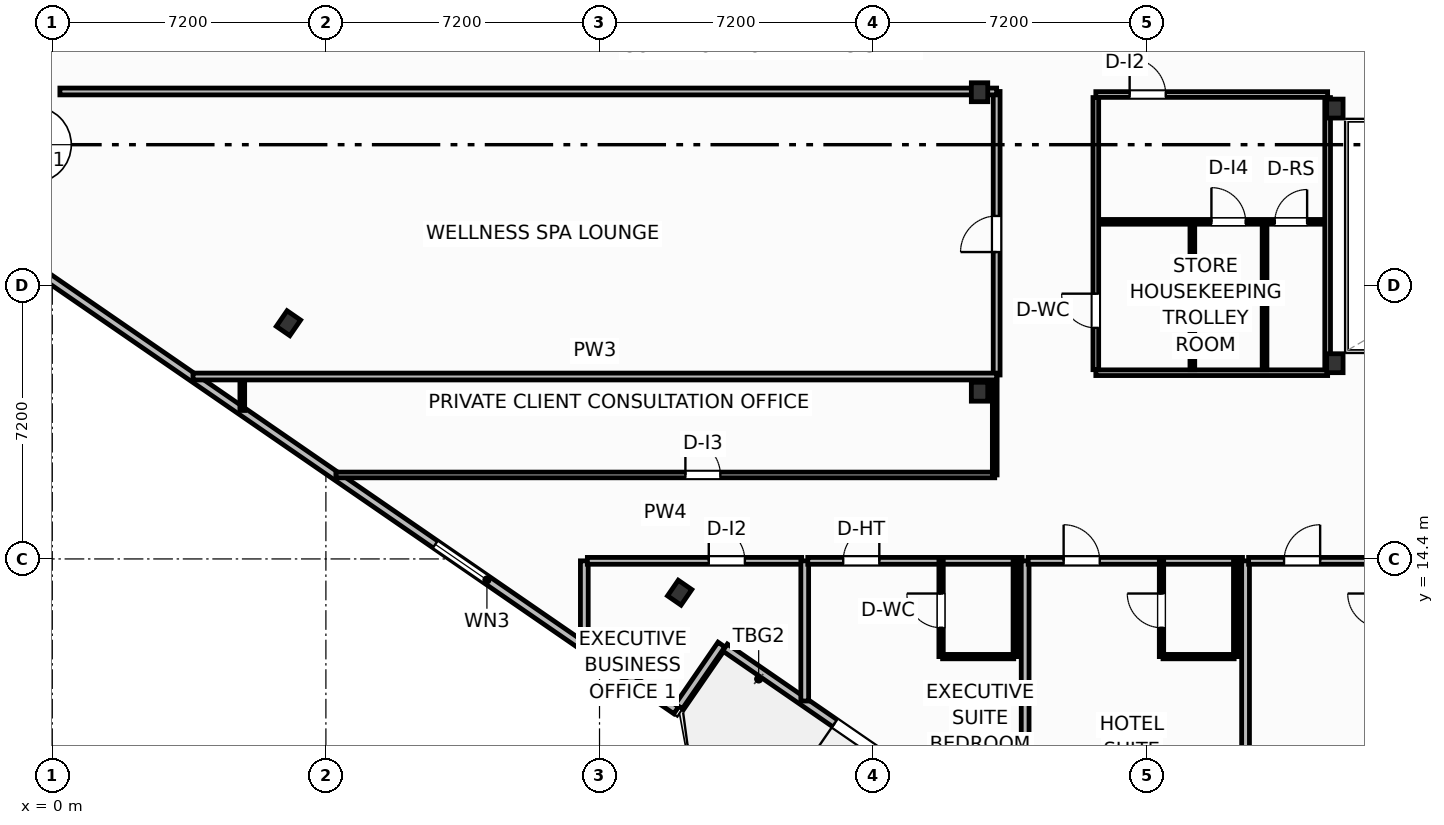
"""IFC4 building model, lengths in metres.
Left out: names, types, materials, properties, quantities, classifications, styles, units other than length and angle.
Written with IfcOpenShell. Run it as: python <this file> out.ifc"""

import sys

from ifc_helpers import new_model, si_unit, direction, frame, frame_2d, origin, origin_2d, place, context, subcontext, project, spatial, rectangle, i_section, extrude, element, fill, save


model = new_model("IFC4")
c1 = context("Model", 3, precision=1e-05, world=origin(), true_north=direction((0.0, 1.0)))
c2 = subcontext(c1, "Body", "Model", "MODEL_VIEW")
j1 = project(units=[si_unit("LENGTHUNIT", "METRE"), si_unit("PLANEANGLEUNIT", "RADIAN")], contexts=[c1])
p1 = place(None, origin())
s1 = spatial("IfcSite", under=j1, at=p1, CompositionType="ELEMENT")
p2 = place(p1, origin())
s2 = spatial("IfcBuilding", under=s1, at=p2, CompositionType="ELEMENT")
p3 = place(p2, frame((0.0, 0.0, 64.0)))
s3 = spatial("IfcBuildingStorey", under=s2, at=p3, CompositionType="ELEMENT", Elevation=64.0)
for number, where, z_axis, x_axis in (
    (1, (33.75, 19.55, 0.0), (0.0, 0.0, 1.0), (1.0, 0.0, 0.0)),
    (2, (33.75, 26.25, 0.0), (0.0, 0.0, 1.0), (1.0, 0.0, 0.0)),
    (3, (24.4, 18.8, 0.0), (0.0, 0.0, 1.0), (1.0, 0.0, 0.0)),
    (4, (24.4, 26.68, 0.0), (0.0, 0.0, 1.0), (1.0, 0.0, 0.0)),
    (5, (6.215, 20.603, 0.0), (0.0, 0.0, 1.0), (0.824, -0.567, 0.0)),
    (6, (16.509, 13.512, 0.0), (0.0, 0.0, 1.0), (0.824, -0.567, 0.0)),
):
    element("IfcColumn", number, at=place(p3, frame(where, z_axis=z_axis, x_axis=x_axis)), inside=s3, PredefinedType="COLUMN", context=c2, shape_type="SweptSolid", body=[
        extrude(i_section(OverallWidth=0.432, OverallDepth=0.498, WebThickness=0.056, FlangeThickness=0.089, FilletRadius=0.025, at=origin_2d()), origin(), (0.0, 0.0, 1.0), 3.7),
    ])
p4 = place(p3, frame((22.643, 8.667, 0.0), z_axis=(0.0, 0.0, 1.0), x_axis=(-0.823534636215, 0.567265989598, 0.0)))
e7 = element("IfcWall", 7, at=p4, inside=s3, PredefinedType="SOLIDWALL", context=c2, shape_type="SweptSolid", body=[
    extrude(rectangle(XDim=6.0, YDim=0.22, at=frame_2d((3.0, 0.0))), origin(), (0.0, 0.0, 1.0), 2.73),
])
p5 = place(p4, frame((0.992, 0.0, 0.0)))
e8 = element("IfcOpeningElement", 8, at=p5, cuts=e7, PredefinedType="OPENING", context=c2, shape_type="SweptSolid", body=[
    extrude(rectangle(XDim=1.5, YDim=2.25, at=frame_2d((0.75, 1.125))), frame((0.0, 0.12, 0.0), z_axis=(0.0, -1.0, 0.0), x_axis=(1.0, 0.0, 0.0)), (0.0, 0.0, 1.0), 0.24),
])
p6 = place(p3, frame((-2.728, 23.605, 0.0), z_axis=(0.0, 0.0, 1.0), x_axis=(0.823535075462, -0.567265351915, 0.0)))
e9 = element("IfcWall", 9, at=p6, inside=s3, PredefinedType="SOLIDWALL", context=c2, shape_type="SweptSolid", body=[
    extrude(rectangle(XDim=23.247, YDim=0.22, at=frame_2d((11.624, 0.0))), origin(), (0.0, 0.0, 1.0), 2.73),
])
p7 = place(p6, frame((15.55, 0.0, 0.8)))
e10 = element("IfcOpeningElement", 10, at=p7, cuts=e9, PredefinedType="OPENING", context=c2, shape_type="SweptSolid", body=[
    extrude(rectangle(XDim=1.65, YDim=1.65, at=frame_2d((0.825, 0.825))), frame((0.0, 0.12, 0.0), z_axis=(0.0, -1.0, 0.0), x_axis=(1.0, 0.0, 0.0)), (0.0, 0.0, 1.0), 0.24),
])
p8 = place(p3, frame((16.488, 10.521, 0.0), z_axis=(0.0, 0.0, 1.0), x_axis=(0.567131976434, 0.823626930902, 0.0)))
e11 = element("IfcWall", 11, at=p8, inside=s3, PredefinedType="SOLIDWALL", context=c2, shape_type="SweptSolid", body=[
    extrude(rectangle(XDim=1.975, YDim=0.22, at=frame_2d((0.988, 0.0))), origin(), (0.0, 0.0, 1.0), 2.73),
])
p9 = place(p3, frame((7.463, 16.61, 0.0), z_axis=(0.0, 0.0, 1.0), x_axis=(1.0, 0.0, 0.0)))
e12 = element("IfcWall", 12, at=p9, inside=s3, PredefinedType="PARTITIONING", context=c2, shape_type="SweptSolid", body=[
    extrude(rectangle(XDim=17.337, YDim=0.15, at=frame_2d((8.668, 0.0))), origin(), (0.0, 0.0, 1.0), 3.45),
])
p10 = place(p9, frame((9.197, 0.0, 0.0)))
e13 = element("IfcOpeningElement", 13, at=p10, cuts=e12, PredefinedType="OPENING", context=c2, shape_type="SweptSolid", body=[
    extrude(rectangle(XDim=0.92, YDim=2.05, at=frame_2d((0.46, 1.025))), frame((0.0, 0.085, 0.0), z_axis=(0.0, -1.0, 0.0), x_axis=(1.0, 0.0, 0.0)), (0.0, 0.0, 1.0), 0.17),
])
p11 = place(p3, frame((5.0, 18.306, 0.0), z_axis=(0.0, 0.0, 1.0), x_axis=(0.0, 1.0, 0.0)))
e14 = element("IfcWall", 14, at=p11, inside=s3, PredefinedType="PARTITIONING", context=c2, shape_type="SweptSolid", body=[
    extrude(rectangle(XDim=0.934, YDim=0.125, at=frame_2d((0.467, 0.0))), origin(), (0.0, 0.0, 1.0), 3.45),
])
p12 = place(p3, frame((24.8, 16.61, 0.0), z_axis=(0.0, 0.0, 1.0), x_axis=(0.0, 1.0, 0.0)))
e15 = element("IfcWall", 15, at=p12, inside=s3, PredefinedType="PARTITIONING", context=c2, shape_type="SweptSolid", body=[
    extrude(rectangle(XDim=2.63, YDim=0.125, at=frame_2d((1.315, 0.0))), origin(), (0.0, 0.0, 1.0), 2.58),
])
p13 = place(p3, frame((14.0, 12.107, 0.0), z_axis=(0.0, 0.0, 1.0), x_axis=(0.0, 1.0, 0.0)))
e16 = element("IfcWall", 16, at=p13, inside=s3, PredefinedType="PARTITIONING", context=c2, shape_type="SweptSolid", body=[
    extrude(rectangle(XDim=2.243, YDim=0.205, at=frame_2d((1.122, 0.0))), origin(), (0.0, 0.0, 1.0), 3.45),
])
p14 = place(p3, frame((14.08, 14.35, 0.0), z_axis=(0.0, 0.0, 1.0), x_axis=(1.0, 0.0, 0.0)))
e17 = element("IfcWall", 17, at=p14, inside=s3, PredefinedType="PARTITIONING", context=c2, shape_type="SweptSolid", body=[
    extrude(rectangle(XDim=5.64, YDim=0.18, at=frame_2d((2.82, 0.0))), origin(), (0.0, 0.0, 1.0), 3.45),
])
p15 = place(p14, frame((3.195, 0.0, 0.0)))
e18 = element("IfcOpeningElement", 18, at=p15, cuts=e17, PredefinedType="OPENING", context=c2, shape_type="SweptSolid", body=[
    extrude(rectangle(XDim=0.95, YDim=2.05, at=frame_2d((0.475, 1.025))), frame((0.0, 0.1, 0.0), z_axis=(0.0, -1.0, 0.0), x_axis=(1.0, 0.0, 0.0)), (0.0, 0.0, 1.0), 0.2),
])
p16 = place(p3, frame((19.8, 10.662, 0.0), z_axis=(0.0, 0.0, 1.0), x_axis=(0.0, 1.0, 0.0)))
e19 = element("IfcWall", 19, at=p16, inside=s3, PredefinedType="PARTITIONING", context=c2, shape_type="SweptSolid", body=[
    extrude(rectangle(XDim=3.688, YDim=0.205, at=frame_2d((1.844, 0.0))), origin(), (0.0, 0.0, 1.0), 3.45),
])
p17 = place(p3, frame((19.88, 14.35, 0.0), z_axis=(0.0, 0.0, 1.0), x_axis=(1.0, 0.0, 0.0)))
e20 = element("IfcWall", 20, at=p17, inside=s3, PredefinedType="PARTITIONING", context=c2, shape_type="SweptSolid", body=[
    extrude(rectangle(XDim=5.64, YDim=0.18, at=frame_2d((2.82, 0.0))), origin(), (0.0, 0.0, 1.0), 3.45),
])
p18 = place(p17, frame((0.933, 0.0, 0.0)))
e21 = element("IfcOpeningElement", 21, at=p18, cuts=e20, PredefinedType="OPENING", context=c2, shape_type="SweptSolid", body=[
    extrude(rectangle(XDim=0.95, YDim=2.15, at=frame_2d((0.475, 1.075))), frame((0.0, 0.1, 0.0), z_axis=(0.0, -1.0, 0.0), x_axis=(1.0, 0.0, 0.0)), (0.0, 0.0, 1.0), 0.2),
])
p19 = place(p3, frame((23.428, 11.83, 0.0), z_axis=(0.0, 0.0, 1.0), x_axis=(1.0, 0.0, 0.0)))
e22 = element("IfcWall", 22, at=p19, inside=s3, PredefinedType="PARTITIONING", context=c2, shape_type="SweptSolid", body=[
    extrude(rectangle(XDim=1.872, YDim=0.115, at=frame_2d((0.936, 0.0))), origin(), (0.0, 0.0, 1.0), 3.45),
])
p20 = place(p3, frame((23.388, 11.83, 0.0), z_axis=(0.0, 0.0, 1.0), x_axis=(0.0, 1.0, 0.0)))
e23 = element("IfcWall", 23, at=p20, inside=s3, PredefinedType="PARTITIONING", context=c2, shape_type="SweptSolid", body=[
    extrude(rectangle(XDim=2.52, YDim=0.115, at=frame_2d((1.26, 0.0))), origin(), (0.0, 0.0, 1.0), 3.45),
])
p21 = place(p20, frame((0.76, 0.0, 0.0)))
e24 = element("IfcOpeningElement", 24, at=p21, cuts=e23, PredefinedType="OPENING", context=c2, shape_type="SweptSolid", body=[
    extrude(rectangle(XDim=0.9, YDim=2.05, at=frame_2d((0.45, 1.025))), frame((0.0, 0.067, 0.0), z_axis=(0.0, -1.0, 0.0), x_axis=(1.0, 0.0, 0.0)), (0.0, 0.0, 1.0), 0.135),
])
p22 = place(p3, frame((25.34, 11.83, 0.0), z_axis=(0.0, 0.0, 1.0), x_axis=(0.0, 1.0, 0.0)))
e25 = element("IfcWall", 25, at=p22, inside=s3, PredefinedType="PARTITIONING", context=c2, shape_type="SweptSolid", body=[
    extrude(rectangle(XDim=2.52, YDim=0.115, at=frame_2d((1.26, 0.0))), origin(), (0.0, 0.0, 1.0), 2.58),
])
p23 = place(p3, frame((25.6, 4.117, 0.0), z_axis=(0.0, 0.0, 1.0), x_axis=(0.0, 1.0, 0.0)))
e26 = element("IfcWall", 26, at=p23, inside=s3, PredefinedType="PARTITIONING", context=c2, shape_type="SweptSolid", body=[
    extrude(rectangle(XDim=10.233, YDim=0.205, at=frame_2d((5.117, 0.0))), origin(), (0.0, 0.0, 1.0), 2.58),
])
p24 = place(p3, frame((25.68, 14.35, 0.0), z_axis=(0.0, 0.0, 1.0), x_axis=(1.0, 0.0, 0.0)))
e27 = element("IfcWall", 27, at=p24, inside=s3, PredefinedType="PARTITIONING", context=c2, shape_type="SweptSolid", body=[
    extrude(rectangle(XDim=5.64, YDim=0.18, at=frame_2d((2.82, 0.0))), origin(), (0.0, 0.0, 1.0), 3.45),
])
p25 = place(p24, frame((0.933, 0.0, 0.0)))
e28 = element("IfcOpeningElement", 28, at=p25, cuts=e27, PredefinedType="OPENING", context=c2, shape_type="SweptSolid", body=[
    extrude(rectangle(XDim=0.95, YDim=2.15, at=frame_2d((0.475, 1.075))), frame((0.0, 0.1, 0.0), z_axis=(0.0, -1.0, 0.0), x_axis=(1.0, 0.0, 0.0)), (0.0, 0.0, 1.0), 0.2),
])
p26 = place(p3, frame((29.228, 11.83, 0.0), z_axis=(0.0, 0.0, 1.0), x_axis=(1.0, 0.0, 0.0)))
e29 = element("IfcWall", 29, at=p26, inside=s3, PredefinedType="PARTITIONING", context=c2, shape_type="SweptSolid", body=[
    extrude(rectangle(XDim=1.872, YDim=0.115, at=frame_2d((0.936, 0.0))), origin(), (0.0, 0.0, 1.0), 3.45),
])
p27 = place(p3, frame((29.188, 11.83, 0.0), z_axis=(0.0, 0.0, 1.0), x_axis=(0.0, 1.0, 0.0)))
e30 = element("IfcWall", 30, at=p27, inside=s3, PredefinedType="PARTITIONING", context=c2, shape_type="SweptSolid", body=[
    extrude(rectangle(XDim=2.52, YDim=0.115, at=frame_2d((1.26, 0.0))), origin(), (0.0, 0.0, 1.0), 3.45),
])
p28 = place(p27, frame((0.76, 0.0, 0.0)))
e31 = element("IfcOpeningElement", 31, at=p28, cuts=e30, PredefinedType="OPENING", context=c2, shape_type="SweptSolid", body=[
    extrude(rectangle(XDim=0.9, YDim=2.05, at=frame_2d((0.45, 1.025))), frame((0.0, 0.067, 0.0), z_axis=(0.0, -1.0, 0.0), x_axis=(1.0, 0.0, 0.0)), (0.0, 0.0, 1.0), 0.135),
])
p29 = place(p3, frame((31.14, 11.83, 0.0), z_axis=(0.0, 0.0, 1.0), x_axis=(0.0, 1.0, 0.0)))
e32 = element("IfcWall", 32, at=p29, inside=s3, PredefinedType="PARTITIONING", context=c2, shape_type="SweptSolid", body=[
    extrude(rectangle(XDim=2.52, YDim=0.115, at=frame_2d((1.26, 0.0))), origin(), (0.0, 0.0, 1.0), 3.45),
])
p30 = place(p3, frame((31.4, 2.671, 0.0), z_axis=(0.0, 0.0, 1.0), x_axis=(0.0, 1.0, 0.0)))
e33 = element("IfcWall", 33, at=p30, inside=s3, PredefinedType="PARTITIONING", context=c2, shape_type="SweptSolid", body=[
    extrude(rectangle(XDim=11.679, YDim=0.205, at=frame_2d((5.839, 0.0))), origin(), (0.0, 0.0, 1.0), 3.45),
])
p31 = place(p3, frame((31.48, 14.35, 0.0), z_axis=(0.0, 0.0, 1.0), x_axis=(1.0, 0.0, 0.0)))
e34 = element("IfcWall", 34, at=p31, inside=s3, PredefinedType="PARTITIONING", context=c2, shape_type="SweptSolid", body=[
    extrude(rectangle(XDim=5.64, YDim=0.18, at=frame_2d((2.82, 0.0))), origin(), (0.0, 0.0, 1.0), 3.45),
])
p32 = place(p31, frame((0.933, 0.0, 0.0)))
e35 = element("IfcOpeningElement", 35, at=p32, cuts=e34, PredefinedType="OPENING", context=c2, shape_type="SweptSolid", body=[
    extrude(rectangle(XDim=0.95, YDim=2.15, at=frame_2d((0.475, 1.075))), frame((0.0, 0.1, 0.0), z_axis=(0.0, -1.0, 0.0), x_axis=(1.0, 0.0, 0.0)), (0.0, 0.0, 1.0), 0.2),
])
p33 = place(p3, frame((24.85, 19.24, 0.0), z_axis=(0.0, 0.0, 1.0), x_axis=(0.0, 1.0, 0.0)))
e36 = element("IfcWall", 36, at=p33, inside=s3, PredefinedType="PARTITIONING", context=c2, shape_type="SweptSolid", body=[
    extrude(rectangle(XDim=7.46, YDim=0.18, at=frame_2d((3.73, 0.0))), origin(), (0.0, 0.0, 1.0), 3.45),
])
p34 = place(p33, frame((3.235, 0.0, 0.0)))
e37 = element("IfcOpeningElement", 37, at=p34, cuts=e36, PredefinedType="OPENING", context=c2, shape_type="SweptSolid", body=[
    extrude(rectangle(XDim=0.95, YDim=2.05, at=frame_2d((0.475, 1.025))), frame((0.0, 0.1, 0.0), z_axis=(0.0, -1.0, 0.0), x_axis=(1.0, 0.0, 0.0)), (0.0, 0.0, 1.0), 0.2),
])
p35 = place(p3, frame((3.703, 19.2, 0.0), z_axis=(0.0, 0.0, 1.0), x_axis=(1.0, 0.0, 0.0)))
e38 = element("IfcWall", 38, at=p35, inside=s3, PredefinedType="PARTITIONING", context=c2, shape_type="SweptSolid", body=[
    extrude(rectangle(XDim=21.147, YDim=0.18, at=frame_2d((10.574, 0.0))), origin(), (0.0, 0.0, 1.0), 2.58),
])
p36 = place(p3, frame((0.2, 26.7, 0.0), z_axis=(0.0, 0.0, 1.0), x_axis=(1.0, 0.0, 0.0)))
e39 = element("IfcWall", 39, at=p36, inside=s3, PredefinedType="PARTITIONING", context=c2, shape_type="SweptSolid", body=[
    extrude(rectangle(XDim=24.65, YDim=0.18, at=frame_2d((12.325, 0.0))), origin(), (0.0, 0.0, 1.0), 2.662),
])
p37 = place(p3, frame((27.46, 26.62, 0.0), z_axis=(0.0, 0.0, 1.0), x_axis=(1.0, 0.0, 0.0)))
e40 = element("IfcWall", 40, at=p37, inside=s3, PredefinedType="PARTITIONING", context=c2, shape_type="SweptSolid", body=[
    extrude(rectangle(XDim=6.1, YDim=0.15, at=frame_2d((3.05, 0.0))), origin(), (0.0, 0.0, 1.0), 2.662),
])
p38 = place(p37, frame((0.89, 0.0, 0.0)))
e41 = element("IfcOpeningElement", 41, at=p38, cuts=e40, PredefinedType="OPENING", context=c2, shape_type="SweptSolid", body=[
    extrude(rectangle(XDim=0.95, YDim=2.05, at=frame_2d((0.475, 1.025))), frame((0.0, 0.085, 0.0), z_axis=(0.0, -1.0, 0.0), x_axis=(1.0, 0.0, 0.0)), (0.0, 0.0, 1.0), 0.17),
])
p39 = place(p3, frame((27.46, 19.3, 0.0), z_axis=(0.0, 0.0, 1.0), x_axis=(1.0, 0.0, 0.0)))
e42 = element("IfcWall", 42, at=p39, inside=s3, PredefinedType="PARTITIONING", context=c2, shape_type="SweptSolid", body=[
    extrude(rectangle(XDim=6.1, YDim=0.15, at=frame_2d((3.05, 0.0))), origin(), (0.0, 0.0, 1.0), 2.662),
])
p40 = place(p3, frame((27.52, 23.27, 0.0), z_axis=(0.0, 0.0, 1.0), x_axis=(1.0, 0.0, 0.0)))
e43 = element("IfcWall", 43, at=p40, inside=s3, PredefinedType="PARTITIONING", context=c2, shape_type="SweptSolid", body=[
    extrude(rectangle(XDim=6.0, YDim=0.125, at=frame_2d((3.0, 0.0))), origin(), (0.0, 0.0, 1.0), 3.45),
])
p41 = place(p40, frame((2.982, 0.0, 0.0)))
e44 = element("IfcOpeningElement", 44, at=p41, cuts=e43, PredefinedType="OPENING", context=c2, shape_type="SweptSolid", body=[
    extrude(rectangle(XDim=0.9, YDim=2.05, at=frame_2d((0.45, 1.025))), frame((0.0, 0.073, 0.0), z_axis=(0.0, -1.0, 0.0), x_axis=(1.0, 0.0, 0.0)), (0.0, 0.0, 1.0), 0.145),
])
p42 = place(p40, frame((4.65, 0.0, 0.0)))
e45 = element("IfcOpeningElement", 45, at=p42, cuts=e43, PredefinedType="OPENING", context=c2, shape_type="SweptSolid", body=[
    extrude(rectangle(XDim=0.85, YDim=2.05, at=frame_2d((0.425, 1.025))), frame((0.0, 0.073, 0.0), z_axis=(0.0, -1.0, 0.0), x_axis=(1.0, 0.0, 0.0)), (0.0, 0.0, 1.0), 0.145),
])
for number, where, z_axis, x_axis in (
    (46, (30.0, 19.38, 0.0), (0.0, 0.0, 1.0), (0.0, 1.0, 0.0)),
    (47, (31.9, 19.38, 0.0), (0.0, 0.0, 1.0), (0.0, 1.0, 0.0)),
):
    element("IfcWall", number, at=place(p3, frame(where, z_axis=z_axis, x_axis=x_axis)), inside=s3, PredefinedType="PARTITIONING", context=c2, shape_type="SweptSolid", body=[
        extrude(rectangle(XDim=3.82, YDim=0.125, at=frame_2d((1.91, 0.0))), origin(), (0.0, 0.0, 1.0), 3.45),
    ])
p43 = place(p3, frame((27.46, 19.38, 0.0), z_axis=(0.0, 0.0, 1.0), x_axis=(0.0, 1.0, 0.0)))
e48 = element("IfcWall", 48, at=p43, inside=s3, PredefinedType="PARTITIONING", context=c2, shape_type="SweptSolid", body=[
    extrude(rectangle(XDim=7.16, YDim=0.15, at=frame_2d((3.58, 0.0))), origin(), (0.0, 0.0, 1.0), 3.45),
])
p44 = place(p43, frame((1.1, 0.0, 0.0)))
e49 = element("IfcOpeningElement", 49, at=p44, cuts=e48, PredefinedType="OPENING", context=c2, shape_type="SweptSolid", body=[
    extrude(rectangle(XDim=0.9, YDim=2.05, at=frame_2d((0.45, 1.025))), frame((0.0, 0.085, 0.0), z_axis=(0.0, -1.0, 0.0), x_axis=(1.0, 0.0, 0.0)), (0.0, 0.0, 1.0), 0.17),
])
p45 = place(p3, frame((33.56, 19.38, 0.0), z_axis=(0.0, 0.0, 1.0), x_axis=(0.0, 1.0, 0.0)))
e50 = element("IfcWall", 50, at=p45, inside=s3, PredefinedType="PARTITIONING", context=c2, shape_type="SweptSolid", body=[
    extrude(rectangle(XDim=7.16, YDim=0.15, at=frame_2d((3.58, 0.0))), origin(), (0.0, 0.0, 1.0), 2.824),
])
p46 = place(p5, origin())
e51 = element("IfcDoor", 51, at=p46, inside=s3, OperationType="SINGLE_SWING_RIGHT", PredefinedType="DOOR", context=c2, shape_type="SweptSolid", body=[
    extrude(rectangle(XDim=1.5, YDim=2.25, at=frame_2d((0.75, 1.125))), frame((0.0, 0.025, 0.0), z_axis=(0.0, -1.0, 0.0), x_axis=(1.0, 0.0, 0.0)), (0.0, 0.0, 1.0), 0.05),
])
fill(e8, e51)
p47 = place(p7, origin())
e52 = element("IfcWindow", 52, at=p47, inside=s3, PartitioningType="SINGLE_PANEL", PredefinedType="WINDOW", context=c2, shape_type="SweptSolid", body=[
    extrude(rectangle(XDim=1.65, YDim=1.65, at=frame_2d((0.825, 0.825))), frame((0.0, 0.03, 0.0), z_axis=(0.0, -1.0, 0.0), x_axis=(1.0, 0.0, 0.0)), (0.0, 0.0, 1.0), 0.06),
])
fill(e10, e52)
p48 = place(p10, origin())
e53 = element("IfcDoor", 53, at=p48, inside=s3, OperationType="SINGLE_SWING_LEFT", PredefinedType="DOOR", context=c2, shape_type="SweptSolid", body=[
    extrude(rectangle(XDim=0.92, YDim=2.05, at=frame_2d((0.46, 1.025))), frame((0.0, 0.025, 0.0), z_axis=(0.0, -1.0, 0.0), x_axis=(1.0, 0.0, 0.0)), (0.0, 0.0, 1.0), 0.05),
])
fill(e13, e53)
p49 = place(p15, origin())
e54 = element("IfcDoor", 54, at=p49, inside=s3, OperationType="SINGLE_SWING_LEFT", PredefinedType="DOOR", context=c2, shape_type="SweptSolid", body=[
    extrude(rectangle(XDim=0.95, YDim=2.05, at=frame_2d((0.475, 1.025))), frame((0.0, 0.025, 0.0), z_axis=(0.0, -1.0, 0.0), x_axis=(1.0, 0.0, 0.0)), (0.0, 0.0, 1.0), 0.05),
])
fill(e18, e54)
p50 = place(p18, origin())
e55 = element("IfcDoor", 55, at=p50, inside=s3, OperationType="SINGLE_SWING_RIGHT", PredefinedType="DOOR", context=c2, shape_type="SweptSolid", body=[
    extrude(rectangle(XDim=0.95, YDim=2.15, at=frame_2d((0.475, 1.075))), frame((0.0, 0.025, 0.0), z_axis=(0.0, -1.0, 0.0), x_axis=(1.0, 0.0, 0.0)), (0.0, 0.0, 1.0), 0.05),
])
fill(e21, e55)
p51 = place(p21, origin())
e56 = element("IfcDoor", 56, at=p51, inside=s3, OperationType="SINGLE_SWING_RIGHT", PredefinedType="DOOR", context=c2, shape_type="SweptSolid", body=[
    extrude(rectangle(XDim=0.9, YDim=2.05, at=frame_2d((0.45, 1.025))), frame((0.0, 0.025, 0.0), z_axis=(0.0, -1.0, 0.0), x_axis=(1.0, 0.0, 0.0)), (0.0, 0.0, 1.0), 0.05),
])
fill(e24, e56)
p52 = place(p25, origin())
e57 = element("IfcDoor", 57, at=p52, inside=s3, OperationType="SINGLE_SWING_LEFT", PredefinedType="DOOR", context=c2, shape_type="SweptSolid", body=[
    extrude(rectangle(XDim=0.95, YDim=2.15, at=frame_2d((0.475, 1.075))), frame((0.0, 0.025, 0.0), z_axis=(0.0, -1.0, 0.0), x_axis=(1.0, 0.0, 0.0)), (0.0, 0.0, 1.0), 0.05),
])
fill(e28, e57)
p53 = place(p28, origin())
e58 = element("IfcDoor", 58, at=p53, inside=s3, OperationType="SINGLE_SWING_RIGHT", PredefinedType="DOOR", context=c2, shape_type="SweptSolid", body=[
    extrude(rectangle(XDim=0.9, YDim=2.05, at=frame_2d((0.45, 1.025))), frame((0.0, 0.025, 0.0), z_axis=(0.0, -1.0, 0.0), x_axis=(1.0, 0.0, 0.0)), (0.0, 0.0, 1.0), 0.05),
])
fill(e31, e58)
p54 = place(p32, origin())
e59 = element("IfcDoor", 59, at=p54, inside=s3, OperationType="SINGLE_SWING_RIGHT", PredefinedType="DOOR", context=c2, shape_type="SweptSolid", body=[
    extrude(rectangle(XDim=0.95, YDim=2.15, at=frame_2d((0.475, 1.075))), frame((0.0, 0.025, 0.0), z_axis=(0.0, -1.0, 0.0), x_axis=(1.0, 0.0, 0.0)), (0.0, 0.0, 1.0), 0.05),
])
fill(e35, e59)
p55 = place(p34, origin())
e60 = element("IfcDoor", 60, at=p55, inside=s3, OperationType="SINGLE_SWING_LEFT", PredefinedType="DOOR", context=c2, shape_type="SweptSolid", body=[
    extrude(rectangle(XDim=0.95, YDim=2.05, at=frame_2d((0.475, 1.025))), frame((0.0, 0.025, 0.0), z_axis=(0.0, -1.0, 0.0), x_axis=(1.0, 0.0, 0.0)), (0.0, 0.0, 1.0), 0.05),
])
fill(e37, e60)
p56 = place(p38, origin())
e61 = element("IfcDoor", 61, at=p56, inside=s3, OperationType="SINGLE_SWING_LEFT", PredefinedType="DOOR", context=c2, shape_type="SweptSolid", body=[
    extrude(rectangle(XDim=0.95, YDim=2.05, at=frame_2d((0.475, 1.025))), frame((0.0, 0.025, 0.0), z_axis=(0.0, -1.0, 0.0), x_axis=(1.0, 0.0, 0.0)), (0.0, 0.0, 1.0), 0.05),
])
fill(e41, e61)
p57 = place(p41, origin())
e62 = element("IfcDoor", 62, at=p57, inside=s3, OperationType="SINGLE_SWING_LEFT", PredefinedType="DOOR", context=c2, shape_type="SweptSolid", body=[
    extrude(rectangle(XDim=0.9, YDim=2.05, at=frame_2d((0.45, 1.025))), frame((0.0, 0.025, 0.0), z_axis=(0.0, -1.0, 0.0), x_axis=(1.0, 0.0, 0.0)), (0.0, 0.0, 1.0), 0.05),
])
fill(e44, e62)
p58 = place(p42, origin())
e63 = element("IfcDoor", 63, at=p58, inside=s3, OperationType="SINGLE_SWING_RIGHT", PredefinedType="DOOR", context=c2, shape_type="SweptSolid", body=[
    extrude(rectangle(XDim=0.85, YDim=2.05, at=frame_2d((0.425, 1.025))), frame((0.0, 0.025, 0.0), z_axis=(0.0, -1.0, 0.0), x_axis=(1.0, 0.0, 0.0)), (0.0, 0.0, 1.0), 0.05),
])
fill(e45, e63)
p59 = place(p44, origin())
e64 = element("IfcDoor", 64, at=p59, inside=s3, OperationType="SINGLE_SWING_RIGHT", PredefinedType="DOOR", context=c2, shape_type="SweptSolid", body=[
    extrude(rectangle(XDim=0.9, YDim=2.05, at=frame_2d((0.45, 1.025))), frame((0.0, 0.025, 0.0), z_axis=(0.0, -1.0, 0.0), x_axis=(1.0, 0.0, 0.0)), (0.0, 0.0, 1.0), 0.05),
])
fill(e49, e64)
save(model, sys.argv[1])
